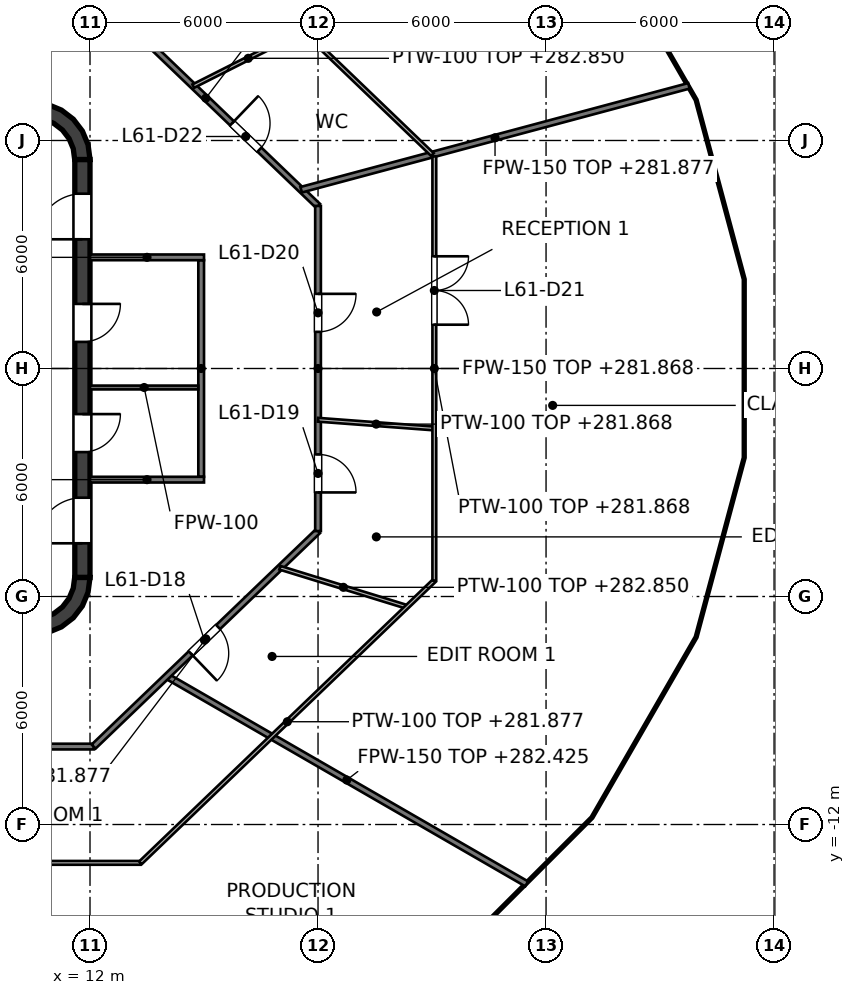
"""IFC4 building model, lengths in metres.
Left out: names, types, materials, properties, quantities, classifications, styles, units other than length and angle.
Written with IfcOpenShell. Run it as: python <this file> out.ifc"""

import sys

from ifc_helpers import new_model, si_unit, direction, frame, frame_2d, origin, place, context, subcontext, project, spatial, polyline, rectangle, outline, extrude, element, fill, save


model = new_model("IFC4")
c1 = context("Model", 3, precision=1e-05, world=origin(), true_north=direction((0.0, 1.0)))
c2 = subcontext(c1, "Body", "Model", "MODEL_VIEW")
j1 = project(units=[si_unit("LENGTHUNIT", "METRE"), si_unit("PLANEANGLEUNIT", "RADIAN")], contexts=[c1])
p1 = place(None, origin())
s1 = spatial("IfcSite", under=j1, at=p1, CompositionType="ELEMENT")
p2 = place(p1, origin())
s2 = spatial("IfcBuilding", under=s1, at=p2, CompositionType="ELEMENT")
p3 = place(p2, frame((0.0, 0.0, 279.0)))
s3 = spatial("IfcBuildingStorey", under=s2, at=p3, CompositionType="ELEMENT", Elevation=279.0)
p4 = place(p3, frame((11.8, -5.5, 0.0), z_axis=(0.0, 0.0, 1.0), x_axis=(0.0, 1.0, 0.0)))
e1 = element("IfcWall", 1, at=p4, inside=s3, PredefinedType="SHEAR", context=c2, shape_type="SweptSolid", body=[
    extrude(rectangle(XDim=11.0, YDim=0.4, at=frame_2d((5.5, 0.0))), origin(), (0.0, 0.0, 1.0), 4.0),
])
p5 = place(p4, frame((3.3, 0.0, 0.0)))
e2 = element("IfcOpeningElement", 2, at=p5, cuts=e1, PredefinedType="OPENING", context=c2, shape_type="SweptSolid", body=[
    extrude(rectangle(XDim=1.0, YDim=2.1, at=frame_2d((0.5, 1.05))), frame((0.0, 0.2, 0.0), z_axis=(0.0, -1.0, 0.0), x_axis=(1.0, 0.0, 0.0)), (0.0, 0.0, 1.0), 0.4),
])
p6 = place(p4, frame((6.2, 0.0, 0.0)))
e3 = element("IfcOpeningElement", 3, at=p6, cuts=e1, PredefinedType="OPENING", context=c2, shape_type="SweptSolid", body=[
    extrude(rectangle(XDim=1.0, YDim=2.1, at=frame_2d((0.5, 1.05))), frame((0.0, 0.2, 0.0), z_axis=(0.0, -1.0, 0.0), x_axis=(1.0, 0.0, 0.0)), (0.0, 0.0, 1.0), 0.4),
])
p7 = place(p4, frame((0.9, 0.0, 0.0)))
e4 = element("IfcOpeningElement", 4, at=p7, cuts=e1, PredefinedType="OPENING", context=c2, shape_type="SweptSolid", body=[
    extrude(rectangle(XDim=1.2, YDim=2.1, at=frame_2d((0.6, 1.05))), frame((0.0, 0.2, 0.0), z_axis=(0.0, -1.0, 0.0), x_axis=(1.0, 0.0, 0.0)), (0.0, 0.0, 1.0), 0.4),
])
p8 = place(p4, frame((8.9, 0.0, 0.0)))
e5 = element("IfcOpeningElement", 5, at=p8, cuts=e1, PredefinedType="OPENING", context=c2, shape_type="SweptSolid", body=[
    extrude(rectangle(XDim=1.2, YDim=2.1, at=frame_2d((0.6, 1.05))), frame((0.0, 0.2, 0.0), z_axis=(0.0, -1.0, 0.0), x_axis=(1.0, 0.0, 0.0)), (0.0, 0.0, 1.0), 0.4),
])
p9 = place(p3, origin())
e6 = element("IfcWall", 6, at=p9, inside=s3, PredefinedType="SHEAR", context=c2, shape_type="SweptSolid", body=[
    extrude(outline(polyline([(10.5, 7.0), (10.5, 6.596), (10.784, 6.559), (11.048, 6.45), (11.275, 6.275), (11.45, 6.048), (11.559, 5.784), (11.596, 5.5), (12.0, 5.5), (11.949, 5.888), (11.799, 6.25), (11.561, 6.561), (11.25, 6.799), (10.888, 6.949), (10.5, 7.0)])), origin(), (0.0, 0.0, 1.0), 4.0),
])
e7 = element("IfcWall", 7, at=p9, inside=s3, PredefinedType="SHEAR", context=c2, shape_type="SweptSolid", body=[
    extrude(outline(polyline([(12.0, -5.5), (11.596, -5.5), (11.559, -5.784), (11.45, -6.048), (11.275, -6.275), (11.048, -6.45), (10.784, -6.559), (10.5, -6.596), (10.5, -7.0), (10.888, -6.949), (11.25, -6.799), (11.561, -6.561), (11.799, -6.25), (11.949, -5.888), (12.0, -5.5)])), origin(), (0.0, 0.0, 1.0), 4.0),
])
p10 = place(p3, frame((14.925, -2.85, 0.0), z_axis=(0.0, 0.0, 1.0), x_axis=(0.0, 1.0, 0.0)))
e8 = element("IfcWall", 8, at=p10, inside=s3, PredefinedType="PARTITIONING", context=c2, shape_type="SweptSolid", body=[
    extrude(rectangle(XDim=5.7, YDim=0.15, at=frame_2d((2.85, 0.0))), origin(), (0.0, 0.0, 1.0), 2.868),
])
for number, where, z_axis, x_axis in (
    (9, (12.0, 2.925, 0.0), (0.0, 0.0, 1.0), (1.0, 0.0, 0.0)),
    (10, (12.0, -2.925, 0.0), (0.0, 0.0, 1.0), (1.0, 0.0, 0.0)),
):
    element("IfcWall", number, at=place(p3, frame(where, z_axis=z_axis, x_axis=x_axis)), inside=s3, PredefinedType="PARTITIONING", context=c2, shape_type="SweptSolid", body=[
        extrude(rectangle(XDim=3.0, YDim=0.15, at=frame_2d((1.5, 0.0))), origin(), (0.0, 0.0, 1.0), 3.85),
    ])
p11 = place(p3, frame((12.0, -0.5, 0.0), z_axis=(0.0, 0.0, 1.0), x_axis=(1.0, 0.0, 0.0)))
e11 = element("IfcWall", 11, at=p11, inside=s3, PredefinedType="PARTITIONING", context=c2, shape_type="SweptSolid", body=[
    extrude(rectangle(XDim=2.85, YDim=0.1, at=frame_2d((1.425, 0.0))), origin(), (0.0, 0.0, 1.0), 3.85),
])
p12 = place(p3, frame((12.095, 9.949, 0.0), z_axis=(0.0, 0.0, 1.0), x_axis=(0.721348586031, -0.692572174889, 0.0)))
e12 = element("IfcWall", 12, at=p12, inside=s3, PredefinedType="PARTITIONING", context=c2, shape_type="SweptSolid", body=[
    extrude(rectangle(XDim=8.187, YDim=0.15, at=frame_2d((4.094, 0.0))), origin(), (0.0, 0.0, 1.0), 2.877),
])
p13 = place(p12, frame((5.05, 0.0, 0.0)))
e13 = element("IfcOpeningElement", 13, at=p13, cuts=e12, PredefinedType="OPENING", context=c2, shape_type="SweptSolid", body=[
    extrude(rectangle(XDim=1.0, YDim=2.1, at=frame_2d((0.5, 1.05))), frame((0.0, 0.075, 0.0), z_axis=(0.0, -1.0, 0.0), x_axis=(1.0, 0.0, 0.0)), (0.0, 0.0, 1.0), 0.15),
])
p14 = place(p3, frame((14.024, -8.097, 0.0), z_axis=(0.0, 0.0, 1.0), x_axis=(0.866031225993, -0.499989915504, 0.0)))
e14 = element("IfcWall", 14, at=p14, inside=s3, PredefinedType="PARTITIONING", context=c2, shape_type="SweptSolid", body=[
    extrude(rectangle(XDim=10.93, YDim=0.15, at=frame_2d((5.465, 0.0))), origin(), (0.0, 0.0, 1.0), 3.425),
])
p15 = place(p3, frame((-12.095, -9.949, 0.0), z_axis=(0.0, 0.0, 1.0), x_axis=(1.0, 0.0, 0.0)))
e15 = element("IfcWall", 15, at=p15, inside=s3, PredefinedType="PARTITIONING", context=c2, shape_type="SweptSolid", body=[
    extrude(rectangle(XDim=24.19, YDim=0.15, at=frame_2d((12.095, 0.0))), origin(), (0.0, 0.0, 1.0), 2.927),
])
p16 = place(p15, frame((16.259, 0.0, 0.0)))
e16 = element("IfcOpeningElement", 16, at=p16, cuts=e15, PredefinedType="OPENING", context=c2, shape_type="SweptSolid", body=[
    extrude(rectangle(XDim=1.0, YDim=2.1, at=frame_2d((0.5, 1.05))), frame((0.0, 0.075, 0.0), z_axis=(0.0, -1.0, 0.0), x_axis=(1.0, 0.0, 0.0)), (0.0, 0.0, 1.0), 0.15),
])
p17 = place(p15, frame((1.016, 0.0, 0.0)))
e17 = element("IfcOpeningElement", 17, at=p17, cuts=e15, PredefinedType="OPENING", context=c2, shape_type="SweptSolid", body=[
    extrude(rectangle(XDim=1.0, YDim=2.1, at=frame_2d((0.5, 1.05))), frame((0.0, 0.075, 0.0), z_axis=(0.0, -1.0, 0.0), x_axis=(1.0, 0.0, 0.0)), (0.0, 0.0, 1.0), 0.15),
])
p18 = place(p15, frame((5.783, 0.0, 0.0)))
e18 = element("IfcOpeningElement", 18, at=p18, cuts=e15, PredefinedType="OPENING", context=c2, shape_type="SweptSolid", body=[
    extrude(rectangle(XDim=1.0, YDim=2.1, at=frame_2d((0.5, 1.05))), frame((0.0, 0.075, 0.0), z_axis=(0.0, -1.0, 0.0), x_axis=(1.0, 0.0, 0.0)), (0.0, 0.0, 1.0), 0.15),
])
p19 = place(p3, frame((17.556, 4.704, 0.0), z_axis=(0.0, 0.0, 1.0), x_axis=(0.96591926591, 0.258843527528, 0.0)))
e19 = element("IfcWall", 19, at=p19, inside=s3, PredefinedType="PARTITIONING", context=c2, shape_type="SweptSolid", body=[
    extrude(rectangle(XDim=10.563, YDim=0.15, at=frame_2d((5.281, 0.0))), origin(), (0.0, 0.0, 1.0), 2.877),
])
p20 = place(p3, frame((12.095, -9.949, 0.0), z_axis=(0.0, 0.0, 1.0), x_axis=(0.721290181137, 0.692633001376, 0.0)))
e20 = element("IfcWall", 20, at=p20, inside=s3, PredefinedType="PARTITIONING", context=c2, shape_type="SweptSolid", body=[
    extrude(rectangle(XDim=8.187, YDim=0.15, at=frame_2d((4.094, 0.0))), origin(), (0.0, 0.0, 1.0), 2.877),
])
p21 = place(p20, frame((3.542, 0.0, 0.0)))
e21 = element("IfcOpeningElement", 21, at=p21, cuts=e20, PredefinedType="OPENING", context=c2, shape_type="SweptSolid", body=[
    extrude(rectangle(XDim=1.0, YDim=2.1, at=frame_2d((0.5, 1.05))), frame((0.0, 0.075, 0.0), z_axis=(0.0, -1.0, 0.0), x_axis=(1.0, 0.0, 0.0)), (0.0, 0.0, 1.0), 0.15),
])
p22 = place(p3, frame((18.0, -4.278, 0.0), z_axis=(0.0, 0.0, 1.0), x_axis=(0.0, 1.0, 0.0)))
e22 = element("IfcWall", 22, at=p22, inside=s3, PredefinedType="PARTITIONING", context=c2, shape_type="SweptSolid", body=[
    extrude(rectangle(XDim=8.556, YDim=0.15, at=frame_2d((4.278, 0.0))), origin(), (0.0, 0.0, 1.0), 2.868),
])
p23 = place(p22, frame((1.017, 0.0, 0.0)))
e23 = element("IfcOpeningElement", 23, at=p23, cuts=e22, PredefinedType="OPENING", context=c2, shape_type="SweptSolid", body=[
    extrude(rectangle(XDim=1.0, YDim=2.1, at=frame_2d((0.5, 1.05))), frame((0.0, 0.075, 0.0), z_axis=(0.0, -1.0, 0.0), x_axis=(1.0, 0.0, 0.0)), (0.0, 0.0, 1.0), 0.15),
])
p24 = place(p22, frame((5.242, 0.0, 0.0)))
e24 = element("IfcOpeningElement", 24, at=p24, cuts=e22, PredefinedType="OPENING", context=c2, shape_type="SweptSolid", body=[
    extrude(rectangle(XDim=1.0, YDim=2.1, at=frame_2d((0.5, 1.05))), frame((0.0, 0.075, 0.0), z_axis=(0.0, -1.0, 0.0), x_axis=(1.0, 0.0, 0.0)), (0.0, 0.0, 1.0), 0.15),
])
p25 = place(p3, frame((9.634, -14.247, 0.0), z_axis=(0.0, 0.0, 1.0), x_axis=(0.560195620851, -0.828360348145, 0.0)))
e25 = element("IfcWall", 25, at=p25, inside=s3, PredefinedType="PARTITIONING", context=c2, shape_type="SweptSolid", body=[
    extrude(rectangle(XDim=7.406, YDim=0.05, at=frame_2d((3.703, 0.0))), origin(), (0.0, 0.0, 1.0), 2.927),
])
p26 = place(p3, frame((13.326, 13.009, 0.0), z_axis=(0.0, 0.0, 1.0), x_axis=(0.721273282207, -0.692650599057, 0.0)))
e26 = element("IfcWall", 26, at=p26, inside=s3, PredefinedType="PARTITIONING", context=c2, shape_type="SweptSolid", body=[
    extrude(rectangle(XDim=10.654, YDim=0.1, at=frame_2d((5.327, 0.0))), origin(), (0.0, 0.0, 1.0), 2.927),
])
p27 = place(p3, frame((16.996, -5.243, 0.0), z_axis=(0.0, 0.0, 1.0), x_axis=(0.955611410755, -0.294629991065, 0.0)))
e27 = element("IfcWall", 27, at=p27, inside=s3, PredefinedType="PARTITIONING", context=c2, shape_type="SweptSolid", body=[
    extrude(rectangle(XDim=3.499, YDim=0.1, at=frame_2d((1.75, 0.0))), origin(), (0.0, 0.0, 1.0), 3.85),
])
p28 = place(p3, frame((18.0, -1.349, 0.0), z_axis=(0.0, 0.0, 1.0), x_axis=(0.997217378468, -0.074548642383, 0.0)))
e28 = element("IfcWall", 28, at=p28, inside=s3, PredefinedType="PARTITIONING", context=c2, shape_type="SweptSolid", body=[
    extrude(rectangle(XDim=3.069, YDim=0.1, at=frame_2d((1.534, 0.0))), origin(), (0.0, 0.0, 1.0), 2.868),
])
p29 = place(p3, frame((-12.553, -13.009, 0.0), z_axis=(0.0, 0.0, 1.0), x_axis=(1.0, 0.0, 0.0)))
e29 = element("IfcWall", 29, at=p29, inside=s3, PredefinedType="PARTITIONING", context=c2, shape_type="SweptSolid", body=[
    extrude(rectangle(XDim=25.879, YDim=0.1, at=frame_2d((12.939, 0.0))), origin(), (0.0, 0.0, 1.0), 2.927),
])
p30 = place(p29, frame((16.973, 0.0, 0.0)))
e30 = element("IfcOpeningElement", 30, at=p30, cuts=e29, PredefinedType="OPENING", context=c2, shape_type="SweptSolid", body=[
    extrude(rectangle(XDim=0.9, YDim=2.1, at=frame_2d((0.45, 1.05))), frame((0.0, 0.05, 0.0), z_axis=(0.0, -1.0, 0.0), x_axis=(1.0, 0.0, 0.0)), (0.0, 0.0, 1.0), 0.1),
])
p31 = place(p29, frame((4.554, 0.0, 0.0)))
e31 = element("IfcOpeningElement", 31, at=p31, cuts=e29, PredefinedType="OPENING", context=c2, shape_type="SweptSolid", body=[
    extrude(rectangle(XDim=0.9, YDim=2.1, at=frame_2d((0.45, 1.05))), frame((0.0, 0.05, 0.0), z_axis=(0.0, -1.0, 0.0), x_axis=(1.0, 0.0, 0.0)), (0.0, 0.0, 1.0), 0.1),
])
p32 = place(p3, frame((14.717, 7.431, 0.0), z_axis=(0.0, 0.0, 1.0), x_axis=(0.892430828446, 0.4511842378, 0.0)))
e32 = element("IfcWall", 32, at=p32, inside=s3, PredefinedType="PARTITIONING", context=c2, shape_type="SweptSolid", body=[
    extrude(rectangle(XDim=3.243, YDim=0.1, at=frame_2d((1.622, 0.0))), origin(), (0.0, 0.0, 1.0), 3.85),
])
p33 = place(p3, frame((13.326, -13.009, 0.0), z_axis=(0.0, 0.0, 1.0), x_axis=(0.721216222175, 0.692710012106, 0.0)))
e33 = element("IfcWall", 33, at=p33, inside=s3, PredefinedType="PARTITIONING", context=c2, shape_type="SweptSolid", body=[
    extrude(rectangle(XDim=10.723, YDim=0.1, at=frame_2d((5.361, 0.0))), origin(), (0.0, 0.0, 1.0), 2.877),
])
p34 = place(p3, frame((21.06, -5.582, 0.0), z_axis=(0.0, 0.0, 1.0), x_axis=(0.0, 1.0, 0.0)))
e34 = element("IfcWall", 34, at=p34, inside=s3, PredefinedType="PARTITIONING", context=c2, shape_type="SweptSolid", body=[
    extrude(rectangle(XDim=11.164, YDim=0.1, at=frame_2d((5.582, 0.0))), origin(), (0.0, 0.0, 1.0), 2.868),
])
p35 = place(p34, frame((6.735, 0.0, 0.0)))
e35 = element("IfcOpeningElement", 35, at=p35, cuts=e34, PredefinedType="OPENING", context=c2, shape_type="SweptSolid", body=[
    extrude(rectangle(XDim=1.8, YDim=2.1, at=frame_2d((0.9, 1.05))), frame((0.0, 0.05, 0.0), z_axis=(0.0, -1.0, 0.0), x_axis=(1.0, 0.0, 0.0)), (0.0, 0.0, 1.0), 0.1),
])
p36 = place(p5, origin())
e36 = element("IfcDoor", 36, at=p36, inside=s3, OperationType="SINGLE_SWING_RIGHT", PredefinedType="DOOR", context=c2, shape_type="SweptSolid", body=[
    extrude(rectangle(XDim=1.0, YDim=2.1, at=frame_2d((0.5, 1.05))), frame((0.0, 0.025, 0.0), z_axis=(0.0, -1.0, 0.0), x_axis=(1.0, 0.0, 0.0)), (0.0, 0.0, 1.0), 0.05),
])
fill(e2, e36)
p37 = place(p6, origin())
e37 = element("IfcDoor", 37, at=p37, inside=s3, OperationType="SINGLE_SWING_RIGHT", PredefinedType="DOOR", context=c2, shape_type="SweptSolid", body=[
    extrude(rectangle(XDim=1.0, YDim=2.1, at=frame_2d((0.5, 1.05))), frame((0.0, 0.025, 0.0), z_axis=(0.0, -1.0, 0.0), x_axis=(1.0, 0.0, 0.0)), (0.0, 0.0, 1.0), 0.05),
])
fill(e3, e37)
p38 = place(p7, origin())
e38 = element("IfcDoor", 38, at=p38, inside=s3, OperationType="SINGLE_SWING_LEFT", PredefinedType="DOOR", context=c2, shape_type="SweptSolid", body=[
    extrude(rectangle(XDim=1.2, YDim=2.1, at=frame_2d((0.6, 1.05))), frame((0.0, 0.025, 0.0), z_axis=(0.0, -1.0, 0.0), x_axis=(1.0, 0.0, 0.0)), (0.0, 0.0, 1.0), 0.05),
])
fill(e4, e38)
p39 = place(p8, origin())
e39 = element("IfcDoor", 39, at=p39, inside=s3, OperationType="SINGLE_SWING_LEFT", PredefinedType="DOOR", context=c2, shape_type="SweptSolid", body=[
    extrude(rectangle(XDim=1.2, YDim=2.1, at=frame_2d((0.6, 1.05))), frame((0.0, 0.025, 0.0), z_axis=(0.0, -1.0, 0.0), x_axis=(1.0, 0.0, 0.0)), (0.0, 0.0, 1.0), 0.05),
])
fill(e5, e39)
p40 = place(p21, origin())
e40 = element("IfcDoor", 40, at=p40, inside=s3, OperationType="SINGLE_SWING_LEFT", PredefinedType="DOOR", context=c2, shape_type="SweptSolid", body=[
    extrude(rectangle(XDim=1.0, YDim=2.1, at=frame_2d((0.5, 1.05))), frame((0.0, 0.025, 0.0), z_axis=(0.0, -1.0, 0.0), x_axis=(1.0, 0.0, 0.0)), (0.0, 0.0, 1.0), 0.05),
])
fill(e21, e40)
p41 = place(p23, origin())
e41 = element("IfcDoor", 41, at=p41, inside=s3, OperationType="SINGLE_SWING_LEFT", PredefinedType="DOOR", context=c2, shape_type="SweptSolid", body=[
    extrude(rectangle(XDim=1.0, YDim=2.1, at=frame_2d((0.5, 1.05))), frame((0.0, 0.025, 0.0), z_axis=(0.0, -1.0, 0.0), x_axis=(1.0, 0.0, 0.0)), (0.0, 0.0, 1.0), 0.05),
])
fill(e23, e41)
p42 = place(p24, origin())
e42 = element("IfcDoor", 42, at=p42, inside=s3, OperationType="SINGLE_SWING_RIGHT", PredefinedType="DOOR", context=c2, shape_type="SweptSolid", body=[
    extrude(rectangle(XDim=1.0, YDim=2.1, at=frame_2d((0.5, 1.05))), frame((0.0, 0.025, 0.0), z_axis=(0.0, -1.0, 0.0), x_axis=(1.0, 0.0, 0.0)), (0.0, 0.0, 1.0), 0.05),
])
fill(e24, e42)
p43 = place(p35, origin())
e43 = element("IfcDoor", 43, at=p43, inside=s3, OperationType="DOUBLE_DOOR_SINGLE_SWING", PredefinedType="DOOR", context=c2, shape_type="SweptSolid", body=[
    extrude(rectangle(XDim=1.8, YDim=2.1, at=frame_2d((0.9, 1.05))), frame((0.0, 0.025, 0.0), z_axis=(0.0, -1.0, 0.0), x_axis=(1.0, 0.0, 0.0)), (0.0, 0.0, 1.0), 0.05),
])
fill(e35, e43)
p44 = place(p13, origin())
e44 = element("IfcDoor", 44, at=p44, inside=s3, OperationType="SINGLE_SWING_LEFT", PredefinedType="DOOR", context=c2, shape_type="SweptSolid", body=[
    extrude(rectangle(XDim=1.0, YDim=2.1, at=frame_2d((0.5, 1.05))), frame((0.0, 0.025, 0.0), z_axis=(0.0, -1.0, 0.0), x_axis=(1.0, 0.0, 0.0)), (0.0, 0.0, 1.0), 0.05),
])
fill(e13, e44)
save(model, sys.argv[1])
